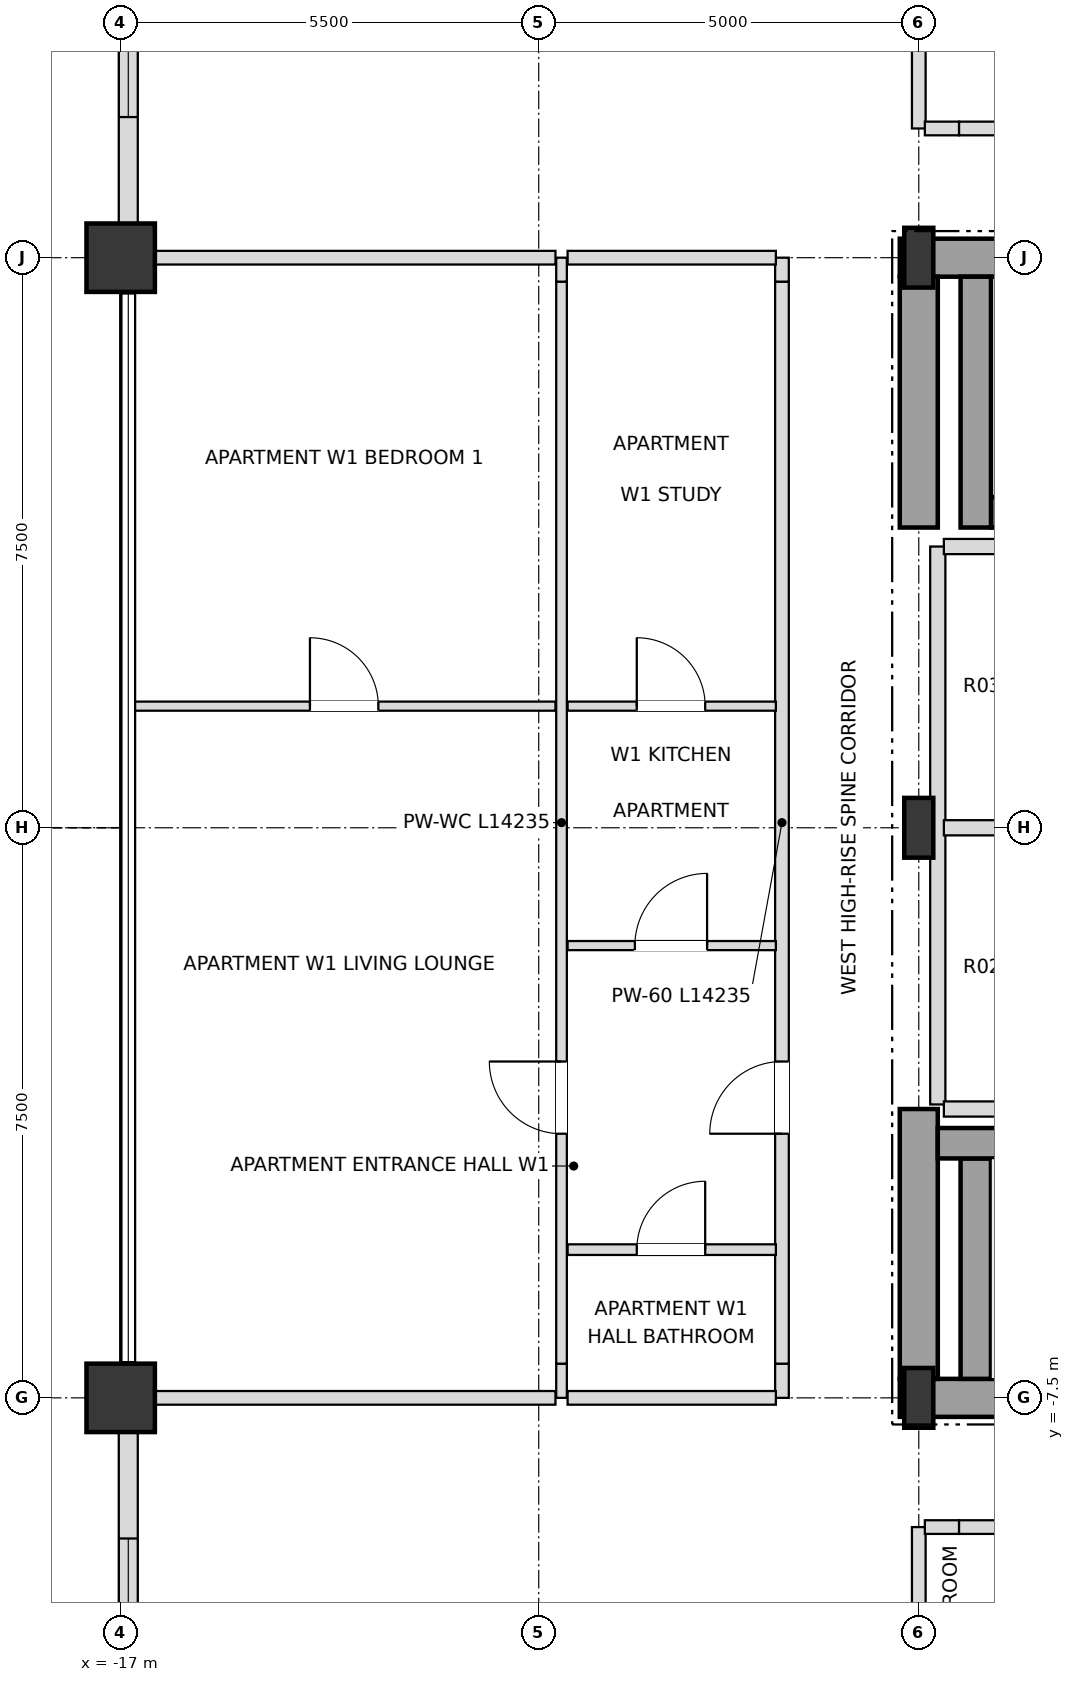
"""IFC4 building model, lengths in metres.
Left out: names, types, materials, properties, quantities, classifications, styles, units other than length and angle.
Written with IfcOpenShell. Run it as: python <this file> out.ifc"""

import sys

from ifc_helpers import new_model, si_unit, direction, frame, frame_2d, origin, origin_2d, place, context, subcontext, project, spatial, rectangle, i_section, extrude, element, fill, save


model = new_model("IFC4")
c1 = context("Model", 3, precision=1e-05, world=origin(), true_north=direction((0.0, 1.0)))
c2 = subcontext(c1, "Body", "Model", "MODEL_VIEW")
j1 = project(units=[si_unit("LENGTHUNIT", "METRE"), si_unit("PLANEANGLEUNIT", "RADIAN")], contexts=[c1])
p1 = place(None, origin())
s1 = spatial("IfcSite", under=j1, at=p1, CompositionType="ELEMENT")
p2 = place(p1, origin())
s2 = spatial("IfcBuilding", under=s1, at=p2, CompositionType="ELEMENT")
p3 = place(p2, frame((0.0, 0.0, 301.5)))
s3 = spatial("IfcBuildingStorey", under=s2, at=p3, CompositionType="ELEMENT", Elevation=301.5)
for number, where, z_axis, x_axis in (
    (1, (-6.5, -7.5, 0.0), (0.0, 0.0, 1.0), (1.0, 0.0, 0.0)),
    (2, (-6.5, 0.0, 0.0), (0.0, 0.0, 1.0), (1.0, 0.0, 0.0)),
    (3, (-6.5, 7.5, 0.0), (0.0, 0.0, 1.0), (1.0, 0.0, 0.0)),
):
    element("IfcColumn", number, at=place(p3, frame(where, z_axis=z_axis, x_axis=x_axis)), inside=s3, PredefinedType="COLUMN", context=c2, shape_type="SweptSolid", body=[
        extrude(i_section(OverallWidth=0.382, OverallDepth=0.786, WebThickness=0.02, FlangeThickness=0.033, at=origin_2d()), origin(), (0.0, 0.0, 1.0), 3.6),
    ])
for number, where, z_axis, x_axis in (
    (4, (-17.0, 7.5, 0.0), (0.0, 0.0, 1.0), (1.0, 0.0, 0.0)),
    (5, (-17.0, -7.5, 0.0), (0.0, 0.0, 1.0), (1.0, 0.0, 0.0)),
):
    element("IfcColumn", number, at=place(p3, frame(where, z_axis=z_axis, x_axis=x_axis)), inside=s3, PredefinedType="USERDEFINED", context=c2, shape_type="SweptSolid", body=[
        extrude(rectangle(XDim=0.9, YDim=0.9, at=origin_2d()), origin(), (0.0, 0.0, 1.0), 3.6),
    ])
p4 = place(p3, frame((-16.9, 12.555, 0.0), z_axis=(0.0, 0.0, 1.0), x_axis=(0.0, -1.0, 0.0)))
e6 = element("IfcWall", 6, at=p4, inside=s3, PredefinedType="SOLIDWALL", context=c2, shape_type="SweptSolid", body=[
    extrude(rectangle(XDim=4.61, YDim=0.25, at=frame_2d((2.305, 0.0))), origin(), (0.0, 0.0, 1.0), 2.668),
])
p5 = place(p4, frame((1.405, 0.0, 0.72)))
e7 = element("IfcOpeningElement", 7, at=p5, cuts=e6, PredefinedType="OPENING", context=c2, shape_type="SweptSolid", body=[
    extrude(rectangle(XDim=1.8, YDim=1.68, at=frame_2d((0.9, 0.84))), frame((0.0, 0.135, 0.0), z_axis=(0.0, -1.0, 0.0), x_axis=(1.0, 0.0, 0.0)), (0.0, 0.0, 1.0), 0.27),
])
p6 = place(p3, frame((-16.9, -7.945, 0.0), z_axis=(0.0, 0.0, 1.0), x_axis=(0.0, -1.0, 0.0)))
e8 = element("IfcWall", 8, at=p6, inside=s3, PredefinedType="SOLIDWALL", context=c2, shape_type="SweptSolid", body=[
    extrude(rectangle(XDim=4.61, YDim=0.25, at=frame_2d((2.305, 0.0))), origin(), (0.0, 0.0, 1.0), 2.668),
])
p7 = place(p6, frame((1.405, 0.0, 0.72)))
e9 = element("IfcOpeningElement", 9, at=p7, cuts=e8, PredefinedType="OPENING", context=c2, shape_type="SweptSolid", body=[
    extrude(rectangle(XDim=1.8, YDim=1.68, at=frame_2d((0.9, 0.84))), frame((0.0, 0.135, 0.0), z_axis=(0.0, -1.0, 0.0), x_axis=(1.0, 0.0, 0.0)), (0.0, 0.0, 1.0), 0.27),
])
p8 = place(p3, frame((-6.75, -7.5, 0.0), z_axis=(0.0, 0.0, 1.0), x_axis=(1.0, 0.0, 0.0)))
e10 = element("IfcWall", 10, at=p8, inside=s3, PredefinedType="SHEAR", context=c2, shape_type="SweptSolid", body=[
    extrude(rectangle(XDim=6.75, YDim=0.5, at=frame_2d((3.375, 0.0))), origin(), (0.0, 0.0, 1.0), 3.3),
])
p9 = place(p3, frame((-6.75, 7.5, 0.0), z_axis=(0.0, 0.0, 1.0), x_axis=(1.0, 0.0, 0.0)))
e11 = element("IfcWall", 11, at=p9, inside=s3, PredefinedType="SHEAR", context=c2, shape_type="SweptSolid", body=[
    extrude(rectangle(XDim=6.75, YDim=0.5, at=frame_2d((3.375, 0.0))), origin(), (0.0, 0.0, 1.0), 3.3),
])
p10 = place(p9, frame((1.65, 0.0, 0.0)))
e12 = element("IfcOpeningElement", 12, at=p10, cuts=e11, PredefinedType="OPENING", context=c2, shape_type="SweptSolid", body=[
    extrude(rectangle(XDim=1.05, YDim=2.15, at=frame_2d((0.525, 1.075))), frame((0.0, 0.26, 0.0), z_axis=(0.0, -1.0, 0.0), x_axis=(1.0, 0.0, 0.0)), (0.0, 0.0, 1.0), 0.52),
])
p11 = place(p3, frame((-6.5, -7.25, 0.0), z_axis=(0.0, 0.0, 1.0), x_axis=(0.0, 1.0, 0.0)))
e13 = element("IfcWall", 13, at=p11, inside=s3, PredefinedType="SHEAR", context=c2, shape_type="SweptSolid", body=[
    extrude(rectangle(XDim=3.55, YDim=0.5, at=frame_2d((1.775, 0.0))), origin(), (0.0, 0.0, 1.0), 3.3),
])
p12 = place(p3, frame((-6.5, 3.95, 0.0), z_axis=(0.0, 0.0, 1.0), x_axis=(0.0, 1.0, 0.0)))
e14 = element("IfcWall", 14, at=p12, inside=s3, PredefinedType="SHEAR", context=c2, shape_type="SweptSolid", body=[
    extrude(rectangle(XDim=3.3, YDim=0.5, at=frame_2d((1.65, 0.0))), origin(), (0.0, 0.0, 1.0), 3.3),
])
p13 = place(p3, frame((-5.75, -7.25, 0.0), z_axis=(0.0, 0.0, 1.0), x_axis=(0.0, 1.0, 0.0)))
e15 = element("IfcWall", 15, at=p13, inside=s3, PredefinedType="SHEAR", context=c2, shape_type="SweptSolid", body=[
    extrude(rectangle(XDim=2.9, YDim=0.4, at=frame_2d((1.45, 0.0))), origin(), (0.0, 0.0, 1.0), 3.3),
])
p14 = place(p3, frame((-6.25, -4.15, 0.0), z_axis=(0.0, 0.0, 1.0), x_axis=(1.0, 0.0, 0.0)))
e16 = element("IfcWall", 16, at=p14, inside=s3, PredefinedType="SHEAR", context=c2, shape_type="SweptSolid", body=[
    extrude(rectangle(XDim=7.78, YDim=0.4, at=frame_2d((3.89, 0.0))), origin(), (0.0, 0.0, 1.0), 3.3),
])
p15 = place(p3, frame((-5.55, 4.15, 0.0), z_axis=(0.0, 0.0, 1.0), x_axis=(1.0, 0.0, 0.0)))
e17 = element("IfcWall", 17, at=p15, inside=s3, PredefinedType="SHEAR", context=c2, shape_type="SweptSolid", body=[
    extrude(rectangle(XDim=7.08, YDim=0.4, at=frame_2d((3.54, 0.0))), origin(), (0.0, 0.0, 1.0), 3.3),
])
p16 = place(p3, frame((-5.75, 3.95, 0.0), z_axis=(0.0, 0.0, 1.0), x_axis=(0.0, 1.0, 0.0)))
e18 = element("IfcWall", 18, at=p16, inside=s3, PredefinedType="SHEAR", context=c2, shape_type="SweptSolid", body=[
    extrude(rectangle(XDim=3.3, YDim=0.4, at=frame_2d((1.65, 0.0))), origin(), (0.0, 0.0, 1.0), 3.3),
])
p17 = place(p3, frame((-11.2, -7.5, 0.0), z_axis=(0.0, 0.0, 1.0), x_axis=(0.0, 1.0, 0.0)))
e19 = element("IfcWall", 19, at=p17, inside=s3, PredefinedType="PARTITIONING", context=c2, shape_type="SweptSolid", body=[
    extrude(rectangle(XDim=0.45, YDim=0.14, at=frame_2d((0.225, 0.0))), origin(), (0.0, 0.0, 1.0), 1.485),
])
p18 = place(p3, frame((-11.2, -7.05, 0.0), z_axis=(0.0, 0.0, 1.0), x_axis=(0.0, 1.0, 0.0)))
e20 = element("IfcWall", 20, at=p18, inside=s3, PredefinedType="PARTITIONING", context=c2, shape_type="SweptSolid", body=[
    extrude(rectangle(XDim=14.235, YDim=0.14, at=frame_2d((7.118, 0.0))), origin(), (0.0, 0.0, 1.0), 3.3),
])
p19 = place(p18, frame((3.025, 0.0, 0.0)))
e21 = element("IfcOpeningElement", 21, at=p19, cuts=e20, PredefinedType="OPENING", context=c2, shape_type="SweptSolid", body=[
    extrude(rectangle(XDim=0.95, YDim=2.1, at=frame_2d((0.475, 1.05))), frame((0.0, 0.08, 0.0), z_axis=(0.0, -1.0, 0.0), x_axis=(1.0, 0.0, 0.0)), (0.0, 0.0, 1.0), 0.16),
])
p20 = place(p3, frame((-11.2, 7.185, 0.0), z_axis=(0.0, 0.0, 1.0), x_axis=(0.0, 1.0, 0.0)))
e22 = element("IfcWall", 22, at=p20, inside=s3, PredefinedType="PARTITIONING", context=c2, shape_type="SweptSolid", body=[
    extrude(rectangle(XDim=0.315, YDim=0.14, at=frame_2d((0.157, 0.0))), origin(), (0.0, 0.0, 1.0), 1.485),
])
p21 = place(p3, frame((-8.3, -7.5, 0.0), z_axis=(0.0, 0.0, 1.0), x_axis=(0.0, 1.0, 0.0)))
e23 = element("IfcWall", 23, at=p21, inside=s3, PredefinedType="PARTITIONING", context=c2, shape_type="SweptSolid", body=[
    extrude(rectangle(XDim=0.45, YDim=0.18, at=frame_2d((0.225, 0.0))), origin(), (0.0, 0.0, 1.0), 1.485),
])
p22 = place(p3, frame((-8.3, -7.05, 0.0), z_axis=(0.0, 0.0, 1.0), x_axis=(0.0, 1.0, 0.0)))
e24 = element("IfcWall", 24, at=p22, inside=s3, PredefinedType="PARTITIONING", context=c2, shape_type="SweptSolid", body=[
    extrude(rectangle(XDim=14.235, YDim=0.18, at=frame_2d((7.118, 0.0))), origin(), (0.0, 0.0, 1.0), 3.3),
])
p23 = place(p22, frame((3.025, 0.0, 0.0)))
e25 = element("IfcOpeningElement", 25, at=p23, cuts=e24, PredefinedType="OPENING", context=c2, shape_type="SweptSolid", body=[
    extrude(rectangle(XDim=0.95, YDim=2.15, at=frame_2d((0.475, 1.075))), frame((0.0, 0.1, 0.0), z_axis=(0.0, -1.0, 0.0), x_axis=(1.0, 0.0, 0.0)), (0.0, 0.0, 1.0), 0.2),
])
p24 = place(p3, frame((-8.3, 7.185, 0.0), z_axis=(0.0, 0.0, 1.0), x_axis=(0.0, 1.0, 0.0)))
e26 = element("IfcWall", 26, at=p24, inside=s3, PredefinedType="PARTITIONING", context=c2, shape_type="SweptSolid", body=[
    extrude(rectangle(XDim=0.315, YDim=0.18, at=frame_2d((0.157, 0.0))), origin(), (0.0, 0.0, 1.0), 1.485),
])
for number, where, z_axis, x_axis in (
    (27, (-6.5, -19.9, 0.0), (0.0, 0.0, 1.0), (0.0, 1.0, 0.0)),
    (28, (-6.5, 9.2, 0.0), (0.0, 0.0, 1.0), (0.0, 1.0, 0.0)),
):
    element("IfcWall", number, at=place(p3, frame(where, z_axis=z_axis, x_axis=x_axis)), inside=s3, PredefinedType="PARTITIONING", context=c2, shape_type="SweptSolid", body=[
        extrude(rectangle(XDim=10.7, YDim=0.18, at=frame_2d((5.35, 0.0))), origin(), (0.0, 0.0, 1.0), 1.485),
    ])
p25 = place(p3, frame((-6.25, -3.64, 0.0), z_axis=(0.0, 0.0, 1.0), x_axis=(0.0, 1.0, 0.0)))
e29 = element("IfcWall", 29, at=p25, inside=s3, PredefinedType="SOLIDWALL", context=c2, shape_type="SweptSolid", body=[
    extrude(rectangle(XDim=7.34, YDim=0.2, at=frame_2d((3.67, 0.0))), origin(), (0.0, 0.0, 1.0), 2.353),
])
p26 = place(p3, frame((-6.42, -9.2, 0.0), z_axis=(0.0, 0.0, 1.0), x_axis=(1.0, 0.0, 0.0)))
e30 = element("IfcWall", 30, at=p26, inside=s3, PredefinedType="PARTITIONING", context=c2, shape_type="SweptSolid", body=[
    extrude(rectangle(XDim=0.45, YDim=0.18, at=frame_2d((0.225, 0.0))), origin(), (0.0, 0.0, 1.0), 1.485),
])
p27 = place(p3, frame((-5.97, -9.2, 0.0), z_axis=(0.0, 0.0, 1.0), x_axis=(1.0, 0.0, 0.0)))
e31 = element("IfcWall", 31, at=p27, inside=s3, PredefinedType="PARTITIONING", context=c2, shape_type="SweptSolid", body=[
    extrude(rectangle(XDim=1.19, YDim=0.18, at=frame_2d((0.595, 0.0))), origin(), (0.0, 0.0, 1.0), 3.3),
])
p28 = place(p3, frame((-16.9, -7.5, 0.0), z_axis=(0.0, 0.0, 1.0), x_axis=(1.0, 0.0, 0.0)))
e32 = element("IfcWall", 32, at=p28, inside=s3, PredefinedType="PARTITIONING", context=c2, shape_type="SweptSolid", body=[
    extrude(rectangle(XDim=5.62, YDim=0.18, at=frame_2d((2.81, 0.0))), origin(), (0.0, 0.0, 1.0), 1.485),
])
p29 = place(p3, frame((-11.12, -7.5, 0.0), z_axis=(0.0, 0.0, 1.0), x_axis=(1.0, 0.0, 0.0)))
e33 = element("IfcWall", 33, at=p29, inside=s3, PredefinedType="PARTITIONING", context=c2, shape_type="SweptSolid", body=[
    extrude(rectangle(XDim=2.74, YDim=0.18, at=frame_2d((1.37, 0.0))), origin(), (0.0, 0.0, 1.0), 1.485),
])
p30 = place(p3, frame((-11.12, -5.55, 0.0), z_axis=(0.0, 0.0, 1.0), x_axis=(1.0, 0.0, 0.0)))
e34 = element("IfcWall", 34, at=p30, inside=s3, PredefinedType="PARTITIONING", context=c2, shape_type="SweptSolid", body=[
    extrude(rectangle(XDim=2.74, YDim=0.14, at=frame_2d((1.37, 0.0))), origin(), (0.0, 0.0, 1.0), 3.3),
])
p31 = place(p30, frame((0.91, 0.0, 0.0)))
e35 = element("IfcOpeningElement", 35, at=p31, cuts=e34, PredefinedType="OPENING", context=c2, shape_type="SweptSolid", body=[
    extrude(rectangle(XDim=0.9, YDim=2.1, at=frame_2d((0.45, 1.05))), frame((0.0, 0.08, 0.0), z_axis=(0.0, -1.0, 0.0), x_axis=(1.0, 0.0, 0.0)), (0.0, 0.0, 1.0), 0.16),
])
p32 = place(p3, frame((-6.17, -3.7, 0.0), z_axis=(0.0, 0.0, 1.0), x_axis=(1.0, 0.0, 0.0)))
e36 = element("IfcWall", 36, at=p32, inside=s3, PredefinedType="SOLIDWALL", context=c2, shape_type="SweptSolid", body=[
    extrude(rectangle(XDim=1.94, YDim=0.2, at=frame_2d((0.97, 0.0))), origin(), (0.0, 0.0, 1.0), 3.3),
])
p33 = place(p3, frame((-11.12, -1.55, 0.0), z_axis=(0.0, 0.0, 1.0), x_axis=(1.0, 0.0, 0.0)))
e37 = element("IfcWall", 37, at=p33, inside=s3, PredefinedType="PARTITIONING", context=c2, shape_type="SweptSolid", body=[
    extrude(rectangle(XDim=2.74, YDim=0.12, at=frame_2d((1.37, 0.0))), origin(), (0.0, 0.0, 1.0), 3.3),
])
p34 = place(p33, frame((0.885, 0.0, 0.0)))
e38 = element("IfcOpeningElement", 38, at=p34, cuts=e37, PredefinedType="OPENING", context=c2, shape_type="SweptSolid", body=[
    extrude(rectangle(XDim=0.95, YDim=2.1, at=frame_2d((0.475, 1.05))), frame((0.0, 0.07, 0.0), z_axis=(0.0, -1.0, 0.0), x_axis=(1.0, 0.0, 0.0)), (0.0, 0.0, 1.0), 0.14),
])
p35 = place(p3, frame((-6.17, 0.0, 0.0), z_axis=(0.0, 0.0, 1.0), x_axis=(1.0, 0.0, 0.0)))
e39 = element("IfcWall", 39, at=p35, inside=s3, PredefinedType="SOLIDWALL", context=c2, shape_type="SweptSolid", body=[
    extrude(rectangle(XDim=1.94, YDim=0.2, at=frame_2d((0.97, 0.0))), origin(), (0.0, 0.0, 1.0), 3.3),
])
p36 = place(p3, frame((-16.82, 1.6, 0.0), z_axis=(0.0, 0.0, 1.0), x_axis=(1.0, 0.0, 0.0)))
e40 = element("IfcWall", 40, at=p36, inside=s3, PredefinedType="PARTITIONING", context=c2, shape_type="SweptSolid", body=[
    extrude(rectangle(XDim=5.54, YDim=0.12, at=frame_2d((2.77, 0.0))), origin(), (0.0, 0.0, 1.0), 3.3),
])
p37 = place(p36, frame((2.31, 0.0, 0.0)))
e41 = element("IfcOpeningElement", 41, at=p37, cuts=e40, PredefinedType="OPENING", context=c2, shape_type="SweptSolid", body=[
    extrude(rectangle(XDim=0.9, YDim=2.1, at=frame_2d((0.45, 1.05))), frame((0.0, 0.07, 0.0), z_axis=(0.0, -1.0, 0.0), x_axis=(1.0, 0.0, 0.0)), (0.0, 0.0, 1.0), 0.14),
])
p38 = place(p3, frame((-11.12, 1.6, 0.0), z_axis=(0.0, 0.0, 1.0), x_axis=(1.0, 0.0, 0.0)))
e42 = element("IfcWall", 42, at=p38, inside=s3, PredefinedType="PARTITIONING", context=c2, shape_type="SweptSolid", body=[
    extrude(rectangle(XDim=2.74, YDim=0.12, at=frame_2d((1.37, 0.0))), origin(), (0.0, 0.0, 1.0), 3.3),
])
p39 = place(p38, frame((0.91, 0.0, 0.0)))
e43 = element("IfcOpeningElement", 43, at=p39, cuts=e42, PredefinedType="OPENING", context=c2, shape_type="SweptSolid", body=[
    extrude(rectangle(XDim=0.9, YDim=2.1, at=frame_2d((0.45, 1.05))), frame((0.0, 0.07, 0.0), z_axis=(0.0, -1.0, 0.0), x_axis=(1.0, 0.0, 0.0)), (0.0, 0.0, 1.0), 0.14),
])
p40 = place(p3, frame((-6.17, 3.7, 0.0), z_axis=(0.0, 0.0, 1.0), x_axis=(1.0, 0.0, 0.0)))
e44 = element("IfcWall", 44, at=p40, inside=s3, PredefinedType="SOLIDWALL", context=c2, shape_type="SweptSolid", body=[
    extrude(rectangle(XDim=1.94, YDim=0.2, at=frame_2d((0.97, 0.0))), origin(), (0.0, 0.0, 1.0), 3.3),
])
p41 = place(p3, frame((-16.9, 7.5, 0.0), z_axis=(0.0, 0.0, 1.0), x_axis=(1.0, 0.0, 0.0)))
e45 = element("IfcWall", 45, at=p41, inside=s3, PredefinedType="PARTITIONING", context=c2, shape_type="SweptSolid", body=[
    extrude(rectangle(XDim=5.62, YDim=0.18, at=frame_2d((2.81, 0.0))), origin(), (0.0, 0.0, 1.0), 1.485),
])
p42 = place(p3, frame((-11.12, 7.5, 0.0), z_axis=(0.0, 0.0, 1.0), x_axis=(1.0, 0.0, 0.0)))
e46 = element("IfcWall", 46, at=p42, inside=s3, PredefinedType="PARTITIONING", context=c2, shape_type="SweptSolid", body=[
    extrude(rectangle(XDim=2.74, YDim=0.18, at=frame_2d((1.37, 0.0))), origin(), (0.0, 0.0, 1.0), 1.485),
])
p43 = place(p3, frame((-6.42, 9.2, 0.0), z_axis=(0.0, 0.0, 1.0), x_axis=(1.0, 0.0, 0.0)))
e47 = element("IfcWall", 47, at=p43, inside=s3, PredefinedType="PARTITIONING", context=c2, shape_type="SweptSolid", body=[
    extrude(rectangle(XDim=0.45, YDim=0.18, at=frame_2d((0.225, 0.0))), origin(), (0.0, 0.0, 1.0), 1.485),
])
p44 = place(p3, frame((-5.97, 9.2, 0.0), z_axis=(0.0, 0.0, 1.0), x_axis=(1.0, 0.0, 0.0)))
e48 = element("IfcWall", 48, at=p44, inside=s3, PredefinedType="PARTITIONING", context=c2, shape_type="SweptSolid", body=[
    extrude(rectangle(XDim=6.89, YDim=0.18, at=frame_2d((3.445, 0.0))), origin(), (0.0, 0.0, 1.0), 3.3),
])
p45 = place(p44, frame((2.755, 0.0, 0.0)))
e49 = element("IfcOpeningElement", 49, at=p45, cuts=e48, PredefinedType="OPENING", context=c2, shape_type="SweptSolid", body=[
    extrude(rectangle(XDim=0.95, YDim=2.15, at=frame_2d((0.475, 1.075))), frame((0.0, 0.1, 0.0), z_axis=(0.0, -1.0, 0.0), x_axis=(1.0, 0.0, 0.0)), (0.0, 0.0, 1.0), 0.2),
])
p46 = place(p5, origin())
e50 = element("IfcWindow", 50, at=p46, inside=s3, PartitioningType="SINGLE_PANEL", PredefinedType="WINDOW", context=c2, shape_type="SweptSolid", body=[
    extrude(rectangle(XDim=1.8, YDim=1.68, at=frame_2d((0.9, 0.84))), frame((0.0, 0.03, 0.0), z_axis=(0.0, -1.0, 0.0), x_axis=(1.0, 0.0, 0.0)), (0.0, 0.0, 1.0), 0.06),
])
fill(e7, e50)
p47 = place(p7, origin())
e51 = element("IfcWindow", 51, at=p47, inside=s3, PartitioningType="SINGLE_PANEL", PredefinedType="WINDOW", context=c2, shape_type="SweptSolid", body=[
    extrude(rectangle(XDim=1.8, YDim=1.68, at=frame_2d((0.9, 0.84))), frame((0.0, 0.03, 0.0), z_axis=(0.0, -1.0, 0.0), x_axis=(1.0, 0.0, 0.0)), (0.0, 0.0, 1.0), 0.06),
])
fill(e9, e51)
p48 = place(p31, origin())
e52 = element("IfcDoor", 52, at=p48, inside=s3, OperationType="SINGLE_SWING_RIGHT", PredefinedType="DOOR", context=c2, shape_type="SweptSolid", body=[
    extrude(rectangle(XDim=0.9, YDim=2.1, at=frame_2d((0.45, 1.05))), frame((0.0, 0.025, 0.0), z_axis=(0.0, -1.0, 0.0), x_axis=(1.0, 0.0, 0.0)), (0.0, 0.0, 1.0), 0.05),
])
fill(e35, e52)
p49 = place(p23, origin())
e53 = element("IfcDoor", 53, at=p49, inside=s3, OperationType="SINGLE_SWING_LEFT", PredefinedType="DOOR", context=c2, shape_type="SweptSolid", body=[
    extrude(rectangle(XDim=0.95, YDim=2.15, at=frame_2d((0.475, 1.075))), frame((0.0, 0.025, 0.0), z_axis=(0.0, -1.0, 0.0), x_axis=(1.0, 0.0, 0.0)), (0.0, 0.0, 1.0), 0.05),
])
fill(e25, e53)
p50 = place(p34, origin())
e54 = element("IfcDoor", 54, at=p50, inside=s3, OperationType="SINGLE_SWING_RIGHT", PredefinedType="DOOR", context=c2, shape_type="SweptSolid", body=[
    extrude(rectangle(XDim=0.95, YDim=2.1, at=frame_2d((0.475, 1.05))), frame((0.0, 0.025, 0.0), z_axis=(0.0, -1.0, 0.0), x_axis=(1.0, 0.0, 0.0)), (0.0, 0.0, 1.0), 0.05),
])
fill(e38, e54)
p51 = place(p39, origin())
e55 = element("IfcDoor", 55, at=p51, inside=s3, OperationType="SINGLE_SWING_LEFT", PredefinedType="DOOR", context=c2, shape_type="SweptSolid", body=[
    extrude(rectangle(XDim=0.9, YDim=2.1, at=frame_2d((0.45, 1.05))), frame((0.0, 0.025, 0.0), z_axis=(0.0, -1.0, 0.0), x_axis=(1.0, 0.0, 0.0)), (0.0, 0.0, 1.0), 0.05),
])
fill(e43, e55)
p52 = place(p19, origin())
e56 = element("IfcDoor", 56, at=p52, inside=s3, OperationType="SINGLE_SWING_RIGHT", PredefinedType="DOOR", context=c2, shape_type="SweptSolid", body=[
    extrude(rectangle(XDim=0.95, YDim=2.1, at=frame_2d((0.475, 1.05))), frame((0.0, 0.025, 0.0), z_axis=(0.0, -1.0, 0.0), x_axis=(1.0, 0.0, 0.0)), (0.0, 0.0, 1.0), 0.05),
])
fill(e21, e56)
p53 = place(p37, origin())
e57 = element("IfcDoor", 57, at=p53, inside=s3, OperationType="SINGLE_SWING_LEFT", PredefinedType="DOOR", context=c2, shape_type="SweptSolid", body=[
    extrude(rectangle(XDim=0.9, YDim=2.1, at=frame_2d((0.45, 1.05))), frame((0.0, 0.025, 0.0), z_axis=(0.0, -1.0, 0.0), x_axis=(1.0, 0.0, 0.0)), (0.0, 0.0, 1.0), 0.05),
])
fill(e41, e57)
save(model, sys.argv[1])
